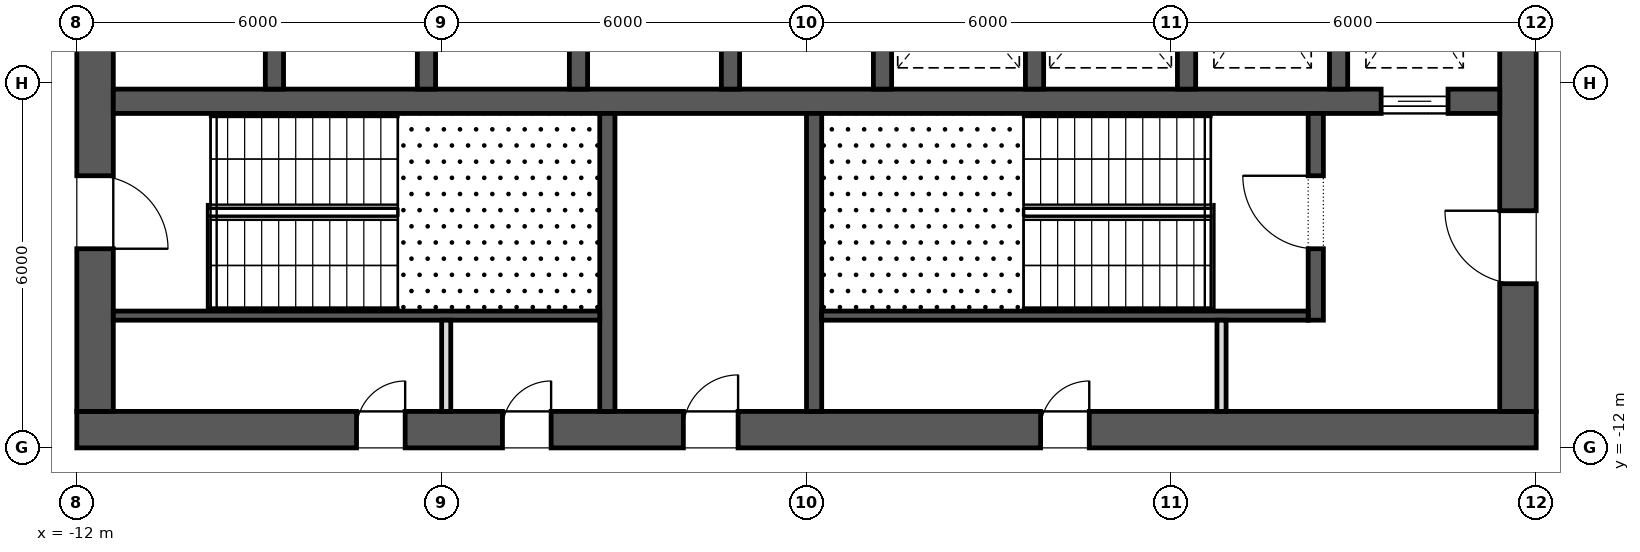
"""IFC4 building model, lengths in metres.
Left out: names, types, materials, properties, quantities, classifications, styles, units other than length and angle.
Written with IfcOpenShell. Run it as: python <this file> out.ifc"""

import sys

from ifc_helpers import new_model, si_unit, direction, frame, frame_2d, origin, place, context, subcontext, project, spatial, rectangle, extrude, element, fill, save


model = new_model("IFC4")
c1 = context("Model", 3, precision=1e-05, world=origin(), true_north=direction((0.0, 1.0)))
c2 = subcontext(c1, "Body", "Model", "MODEL_VIEW")
j1 = project(units=[si_unit("LENGTHUNIT", "METRE"), si_unit("PLANEANGLEUNIT", "RADIAN")], contexts=[c1])
p1 = place(None, origin())
s1 = spatial("IfcSite", under=j1, at=p1, CompositionType="ELEMENT")
p2 = place(p1, origin())
s2 = spatial("IfcBuilding", under=s1, at=p2, CompositionType="ELEMENT")
p3 = place(p2, frame((0.0, 0.0, 82.3)))
s3 = spatial("IfcBuildingStorey", under=s2, at=p3, CompositionType="ELEMENT", Elevation=82.3)
p4 = place(p3, frame((-12.0, -11.7, 0.0), z_axis=(0.0, 0.0, 1.0), x_axis=(1.0, 0.0, 0.0)))
e1 = element("IfcWall", 1, at=p4, inside=s3, PredefinedType="SHEAR", context=c2, shape_type="SweptSolid", body=[
    extrude(rectangle(XDim=24.0, YDim=0.6, at=frame_2d((12.0, 0.0))), origin(), (0.0, 0.0, 1.0), 4.2),
])
p5 = place(p4, frame((9.975, 0.0, 0.0)))
e2 = element("IfcOpeningElement", 2, at=p5, cuts=e1, PredefinedType="OPENING", context=c2, shape_type="SweptSolid", body=[
    extrude(rectangle(XDim=0.9, YDim=2.1, at=frame_2d((0.45, 1.05))), frame((0.0, 0.312, 0.0), z_axis=(0.0, -1.0, 0.0), x_axis=(1.0, 0.0, 0.0)), (0.0, 0.0, 1.0), 0.624),
])
p6 = place(p4, frame((4.6, 0.0, 0.0)))
e3 = element("IfcOpeningElement", 3, at=p6, cuts=e1, PredefinedType="OPENING", context=c2, shape_type="SweptSolid", body=[
    extrude(rectangle(XDim=0.8, YDim=2.1, at=frame_2d((0.4, 1.05))), frame((0.0, 0.312, 0.0), z_axis=(0.0, -1.0, 0.0), x_axis=(1.0, 0.0, 0.0)), (0.0, 0.0, 1.0), 0.624),
])
p7 = place(p4, frame((7.0, 0.0, 0.0)))
e4 = element("IfcOpeningElement", 4, at=p7, cuts=e1, PredefinedType="OPENING", context=c2, shape_type="SweptSolid", body=[
    extrude(rectangle(XDim=0.8, YDim=2.1, at=frame_2d((0.4, 1.05))), frame((0.0, 0.312, 0.0), z_axis=(0.0, -1.0, 0.0), x_axis=(1.0, 0.0, 0.0)), (0.0, 0.0, 1.0), 0.624),
])
p8 = place(p4, frame((15.85, 0.0, 0.0)))
e5 = element("IfcOpeningElement", 5, at=p8, cuts=e1, PredefinedType="OPENING", context=c2, shape_type="SweptSolid", body=[
    extrude(rectangle(XDim=0.8, YDim=2.1, at=frame_2d((0.4, 1.05))), frame((0.0, 0.312, 0.0), z_axis=(0.0, -1.0, 0.0), x_axis=(1.0, 0.0, 0.0)), (0.0, 0.0, 1.0), 0.624),
])
p9 = place(p3, frame((11.7, -11.4, 0.0), z_axis=(0.0, 0.0, 1.0), x_axis=(0.0, 1.0, 0.0)))
e6 = element("IfcWall", 6, at=p9, inside=s3, PredefinedType="SHEAR", context=c2, shape_type="SweptSolid", body=[
    extrude(rectangle(XDim=22.8, YDim=0.6, at=frame_2d((11.4, 0.0))), origin(), (0.0, 0.0, 1.0), 4.2),
])
p10 = place(p9, frame((10.2, 0.0, 0.0)))
e7 = element("IfcOpeningElement", 7, at=p10, cuts=e6, PredefinedType="OPENING", context=c2, shape_type="SweptSolid", body=[
    extrude(rectangle(XDim=2.4, YDim=2.1, at=frame_2d((1.2, 1.05))), frame((0.0, 0.312, 0.0), z_axis=(0.0, -1.0, 0.0), x_axis=(1.0, 0.0, 0.0)), (0.0, 0.0, 1.0), 0.624),
])
p11 = place(p9, frame((19.5, 0.0, 0.0)))
e8 = element("IfcOpeningElement", 8, at=p11, cuts=e6, PredefinedType="OPENING", context=c2, shape_type="SweptSolid", body=[
    extrude(rectangle(XDim=1.2, YDim=2.1, at=frame_2d((0.6, 1.05))), frame((0.0, 0.312, 0.0), z_axis=(0.0, -1.0, 0.0), x_axis=(1.0, 0.0, 0.0)), (0.0, 0.0, 1.0), 0.624),
])
p12 = place(p9, frame((2.1, 0.0, 0.0)))
e9 = element("IfcOpeningElement", 9, at=p12, cuts=e6, PredefinedType="OPENING", context=c2, shape_type="SweptSolid", body=[
    extrude(rectangle(XDim=1.2, YDim=2.1, at=frame_2d((0.6, 1.05))), frame((0.0, 0.312, 0.0), z_axis=(0.0, -1.0, 0.0), x_axis=(1.0, 0.0, 0.0)), (0.0, 0.0, 1.0), 0.624),
])
p13 = place(p3, frame((-11.7, -11.4, 0.0), z_axis=(0.0, 0.0, 1.0), x_axis=(0.0, 1.0, 0.0)))
e10 = element("IfcWall", 10, at=p13, inside=s3, PredefinedType="SHEAR", context=c2, shape_type="SweptSolid", body=[
    extrude(rectangle(XDim=22.8, YDim=0.6, at=frame_2d((11.4, 0.0))), origin(), (0.0, 0.0, 1.0), 4.2),
])
p14 = place(p13, frame((10.2, 0.0, 0.0)))
e11 = element("IfcOpeningElement", 11, at=p14, cuts=e10, PredefinedType="OPENING", context=c2, shape_type="SweptSolid", body=[
    extrude(rectangle(XDim=2.4, YDim=2.1, at=frame_2d((1.2, 1.05))), frame((0.0, 0.312, 0.0), z_axis=(0.0, -1.0, 0.0), x_axis=(1.0, 0.0, 0.0)), (0.0, 0.0, 1.0), 0.624),
])
p15 = place(p13, frame((18.925, 0.0, 0.0)))
e12 = element("IfcOpeningElement", 12, at=p15, cuts=e10, PredefinedType="OPENING", context=c2, shape_type="SweptSolid", body=[
    extrude(rectangle(XDim=1.2, YDim=2.1, at=frame_2d((0.6, 1.05))), frame((0.0, 0.312, 0.0), z_axis=(0.0, -1.0, 0.0), x_axis=(1.0, 0.0, 0.0)), (0.0, 0.0, 1.0), 0.624),
])
p16 = place(p13, frame((2.675, 0.0, 0.0)))
e13 = element("IfcOpeningElement", 13, at=p16, cuts=e10, PredefinedType="OPENING", context=c2, shape_type="SweptSolid", body=[
    extrude(rectangle(XDim=1.2, YDim=2.1, at=frame_2d((0.6, 1.05))), frame((0.0, 0.312, 0.0), z_axis=(0.0, -1.0, 0.0), x_axis=(1.0, 0.0, 0.0)), (0.0, 0.0, 1.0), 0.624),
])
p17 = place(p3, frame((-11.4, -6.3, 0.0), z_axis=(0.0, 0.0, 1.0), x_axis=(1.0, 0.0, 0.0)))
e14 = element("IfcWall", 14, at=p17, inside=s3, PredefinedType="SHEAR", context=c2, shape_type="SweptSolid", body=[
    extrude(rectangle(XDim=22.8, YDim=0.4, at=frame_2d((11.4, 0.0))), origin(), (0.0, 0.0, 1.0), 4.2),
])
p18 = place(p17, frame((20.85, 0.0, 0.0)))
e15 = element("IfcOpeningElement", 15, at=p18, cuts=e14, PredefinedType="OPENING", context=c2, shape_type="SweptSolid", body=[
    extrude(rectangle(XDim=1.1, YDim=2.1, at=frame_2d((0.55, 1.05))), frame((0.0, 0.212, 0.0), z_axis=(0.0, -1.0, 0.0), x_axis=(1.0, 0.0, 0.0)), (0.0, 0.0, 1.0), 0.424),
])
for number, where, z_axis, x_axis in (
    (16, (-8.75, -6.1, 0.0), (0.0, 0.0, 1.0), (0.0, 1.0, 0.0)),
    (17, (-6.25, -6.1, 0.0), (0.0, 0.0, 1.0), (0.0, 1.0, 0.0)),
    (18, (-3.75, -6.1, 0.0), (0.0, 0.0, 1.0), (0.0, 1.0, 0.0)),
    (19, (-1.25, -6.1, 0.0), (0.0, 0.0, 1.0), (0.0, 1.0, 0.0)),
    (20, (1.25, -6.1, 0.0), (0.0, 0.0, 1.0), (0.0, 1.0, 0.0)),
    (21, (3.75, -6.1, 0.0), (0.0, 0.0, 1.0), (0.0, 1.0, 0.0)),
    (22, (6.25, -6.1, 0.0), (0.0, 0.0, 1.0), (0.0, 1.0, 0.0)),
    (23, (8.75, -6.1, 0.0), (0.0, 0.0, 1.0), (0.0, 1.0, 0.0)),
):
    element("IfcWall", number, at=place(p3, frame(where, z_axis=z_axis, x_axis=x_axis)), inside=s3, PredefinedType="SHEAR", context=c2, shape_type="SweptSolid", body=[
        extrude(rectangle(XDim=2.9, YDim=0.3, at=frame_2d((1.45, 0.0))), origin(), (0.0, 0.0, 1.0), 4.2),
    ])
for number, where, z_axis, x_axis in (
    (24, (-3.275, -11.4, 0.0), (0.0, 0.0, 1.0), (0.0, 1.0, 0.0)),
    (25, (0.125, -11.4, 0.0), (0.0, 0.0, 1.0), (0.0, 1.0, 0.0)),
):
    element("IfcWall", number, at=place(p3, frame(where, z_axis=z_axis, x_axis=x_axis)), inside=s3, PredefinedType="SHEAR", context=c2, shape_type="SweptSolid", body=[
        extrude(rectangle(XDim=4.9, YDim=0.25, at=frame_2d((2.45, 0.0))), origin(), (0.0, 0.0, 1.0), 3.9),
    ])
p19 = place(p3, frame((8.375, -9.9, 0.0), z_axis=(0.0, 0.0, 1.0), x_axis=(0.0, 1.0, 0.0)))
e26 = element("IfcWall", 26, at=p19, inside=s3, PredefinedType="SHEAR", context=c2, shape_type="SweptSolid", body=[
    extrude(rectangle(XDim=3.4, YDim=0.25, at=frame_2d((1.7, 0.0))), origin(), (0.0, 0.0, 1.0), 3.9),
])
p20 = place(p19, frame((1.175, 0.0, 0.0)))
e27 = element("IfcOpeningElement", 27, at=p20, cuts=e26, PredefinedType="OPENING", context=c2, shape_type="SweptSolid", body=[
    extrude(rectangle(XDim=1.2, YDim=2.1, at=frame_2d((0.6, 1.05))), frame((0.0, 0.137, 0.0), z_axis=(0.0, -1.0, 0.0), x_axis=(1.0, 0.0, 0.0)), (0.0, 0.0, 1.0), 0.274),
])
for number, where, z_axis, x_axis in (
    (28, (-11.4, -9.825, 0.0), (0.0, 0.0, 1.0), (1.0, 0.0, 0.0)),
    (29, (0.25, -9.825, 0.0), (0.0, 0.0, 1.0), (1.0, 0.0, 0.0)),
):
    element("IfcWall", number, at=place(p3, frame(where, z_axis=z_axis, x_axis=x_axis)), inside=s3, PredefinedType="SHEAR", context=c2, shape_type="SweptSolid", body=[
        extrude(rectangle(XDim=8.0, YDim=0.15, at=frame_2d((4.0, 0.0))), origin(), (0.0, 0.0, 1.0), 3.9),
    ])
for number, where, z_axis, x_axis in (
    (30, (-5.925, -11.4, 0.0), (0.0, 0.0, 1.0), (0.0, 1.0, 0.0)),
    (31, (6.825, -11.4, 0.0), (0.0, 0.0, 1.0), (0.0, 1.0, 0.0)),
):
    element("IfcWall", number, at=place(p3, frame(where, z_axis=z_axis, x_axis=x_axis)), inside=s3, PredefinedType="PARTITIONING", context=c2, shape_type="SweptSolid", body=[
        extrude(rectangle(XDim=1.5, YDim=0.15, at=frame_2d((0.75, 0.0))), origin(), (0.0, 0.0, 1.0), 3.9),
    ])
p21 = place(p18, origin())
e32 = element("IfcDoor", 32, at=p21, inside=s3, OperationType="SLIDING_TO_LEFT", PredefinedType="DOOR", context=c2, shape_type="SweptSolid", body=[
    extrude(rectangle(XDim=1.1, YDim=2.1, at=frame_2d((0.55, 1.05))), frame((0.0, 0.025, 0.0), z_axis=(0.0, -1.0, 0.0), x_axis=(1.0, 0.0, 0.0)), (0.0, 0.0, 1.0), 0.05),
])
fill(e15, e32)
p22 = place(p16, frame((1.2, 0.0, 0.0), z_axis=(0.0, 0.0, 1.0), x_axis=(-1.0, 0.0, 0.0)))
e33 = element("IfcDoor", 33, at=p22, inside=s3, OperationType="SINGLE_SWING_LEFT", PredefinedType="DOOR", context=c2, shape_type="SweptSolid", body=[
    extrude(rectangle(XDim=1.2, YDim=2.1, at=frame_2d((0.6, 1.05))), frame((0.0, 0.025, 0.0), z_axis=(0.0, -1.0, 0.0), x_axis=(1.0, 0.0, 0.0)), (0.0, 0.0, 1.0), 0.05),
])
fill(e13, e33)
p23 = place(p20, origin())
e34 = element("IfcDoor", 34, at=p23, inside=s3, OperationType="SINGLE_SWING_LEFT", PredefinedType="DOOR", context=c2, shape_type="SweptSolid", body=[
    extrude(rectangle(XDim=1.2, YDim=2.1, at=frame_2d((0.6, 1.05))), frame((0.0, 0.025, 0.0), z_axis=(0.0, -1.0, 0.0), x_axis=(1.0, 0.0, 0.0)), (0.0, 0.0, 1.0), 0.05),
])
fill(e27, e34)
p24 = place(p12, origin())
e35 = element("IfcDoor", 35, at=p24, inside=s3, OperationType="SINGLE_SWING_LEFT", PredefinedType="DOOR", context=c2, shape_type="SweptSolid", body=[
    extrude(rectangle(XDim=1.2, YDim=2.1, at=frame_2d((0.6, 1.05))), frame((0.0, 0.025, 0.0), z_axis=(0.0, -1.0, 0.0), x_axis=(1.0, 0.0, 0.0)), (0.0, 0.0, 1.0), 0.05),
])
fill(e9, e35)
p25 = place(p5, origin())
e36 = element("IfcDoor", 36, at=p25, inside=s3, OperationType="SINGLE_SWING_LEFT", PredefinedType="DOOR", context=c2, shape_type="SweptSolid", body=[
    extrude(rectangle(XDim=0.9, YDim=2.1, at=frame_2d((0.45, 1.05))), frame((0.0, 0.025, 0.0), z_axis=(0.0, -1.0, 0.0), x_axis=(1.0, 0.0, 0.0)), (0.0, 0.0, 1.0), 0.05),
])
fill(e2, e36)
p26 = place(p6, origin())
e37 = element("IfcDoor", 37, at=p26, inside=s3, OperationType="SINGLE_SWING_LEFT", PredefinedType="DOOR", context=c2, shape_type="SweptSolid", body=[
    extrude(rectangle(XDim=0.8, YDim=2.1, at=frame_2d((0.4, 1.05))), frame((0.0, 0.025, 0.0), z_axis=(0.0, -1.0, 0.0), x_axis=(1.0, 0.0, 0.0)), (0.0, 0.0, 1.0), 0.05),
])
fill(e3, e37)
p27 = place(p7, origin())
e38 = element("IfcDoor", 38, at=p27, inside=s3, OperationType="SINGLE_SWING_LEFT", PredefinedType="DOOR", context=c2, shape_type="SweptSolid", body=[
    extrude(rectangle(XDim=0.8, YDim=2.1, at=frame_2d((0.4, 1.05))), frame((0.0, 0.025, 0.0), z_axis=(0.0, -1.0, 0.0), x_axis=(1.0, 0.0, 0.0)), (0.0, 0.0, 1.0), 0.05),
])
fill(e4, e38)
p28 = place(p8, origin())
e39 = element("IfcDoor", 39, at=p28, inside=s3, OperationType="SINGLE_SWING_LEFT", PredefinedType="DOOR", context=c2, shape_type="SweptSolid", body=[
    extrude(rectangle(XDim=0.8, YDim=2.1, at=frame_2d((0.4, 1.05))), frame((0.0, 0.025, 0.0), z_axis=(0.0, -1.0, 0.0), x_axis=(1.0, 0.0, 0.0)), (0.0, 0.0, 1.0), 0.05),
])
fill(e5, e39)
save(model, sys.argv[1])
